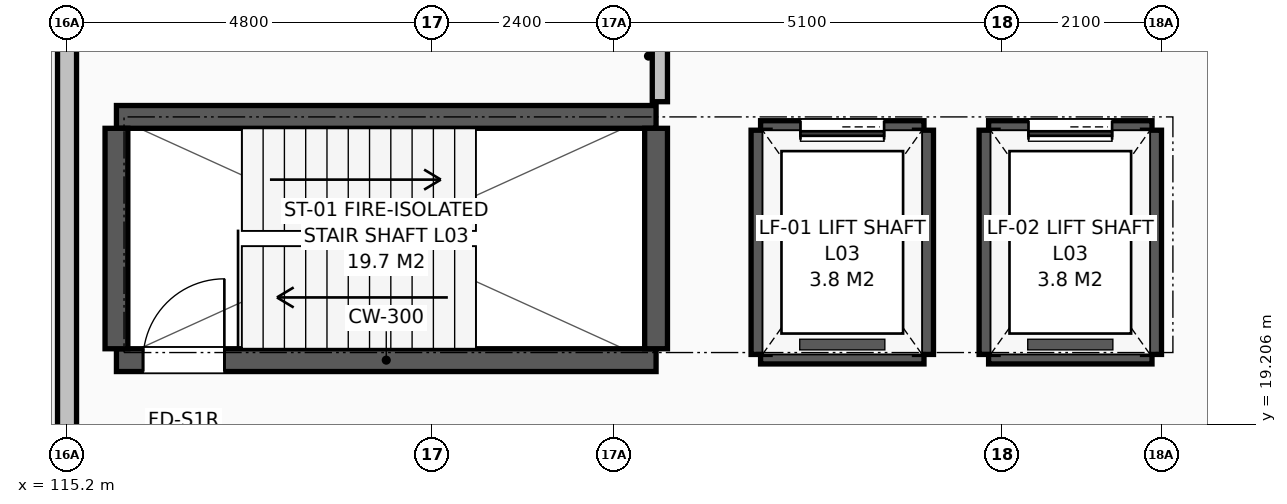
"""IFC4 building model, lengths in metres.
Left out: names, types, materials, properties, quantities, classifications, styles, units other than length and angle.
Written with IfcOpenShell. Run it as: python <this file> out.ifc"""

import sys

from ifc_helpers import new_model, si_unit, direction, frame, frame_2d, origin, place, context, subcontext, project, spatial, rectangle, extrude, element, fill, save


model = new_model("IFC4")
c1 = context("Model", 3, precision=1e-05, world=origin(), true_north=direction((0.0, 1.0)))
c2 = subcontext(c1, "Body", "Model", "MODEL_VIEW")
j1 = project(units=[si_unit("LENGTHUNIT", "METRE"), si_unit("PLANEANGLEUNIT", "RADIAN")], contexts=[c1])
p1 = place(None, origin())
s1 = spatial("IfcSite", under=j1, at=p1, CompositionType="ELEMENT")
p2 = place(p1, origin())
s2 = spatial("IfcBuilding", under=s1, at=p2, CompositionType="ELEMENT")
p3 = place(p2, frame((0.0, 0.0, 13.2)))
s3 = spatial("IfcBuildingStorey", under=s2, at=p3, CompositionType="ELEMENT", Elevation=13.2)
p4 = place(p3, frame((115.2, 32.4, 0.0), z_axis=(0.0, 0.0, 1.0), x_axis=(0.0, -1.0, 0.0)))
e1 = element("IfcWall", 1, at=p4, inside=s3, PredefinedType="SOLIDWALL", context=c2, shape_type="SweptSolid", body=[
    extrude(rectangle(XDim=30.0, YDim=0.25, at=frame_2d((15.0, 0.0))), origin(), (0.0, 0.0, 1.0), 3.253),
])
p5 = place(p4, frame((18.0, 0.0, 0.0)))
e2 = element("IfcOpeningElement", 2, at=p5, cuts=e1, PredefinedType="OPENING", context=c2, shape_type="SweptSolid", body=[
    extrude(rectangle(XDim=1.1, YDim=2.15, at=frame_2d((0.55, 1.075))), frame((0.0, 0.135, 0.0), z_axis=(0.0, -1.0, 0.0), x_axis=(1.0, 0.0, 0.0)), (0.0, 0.0, 1.0), 0.27),
])
p6 = place(p3, frame((115.85, 20.05, 0.0), z_axis=(0.0, 0.0, 1.0), x_axis=(1.0, 0.0, 0.0)))
e3 = element("IfcWall", 3, at=p6, inside=s3, PredefinedType="SHEAR", context=c2, shape_type="SweptSolid", body=[
    extrude(rectangle(XDim=7.1, YDim=0.3, at=frame_2d((3.55, 0.0))), origin(), (0.0, 0.0, 1.0), 3.45),
])
p7 = place(p6, frame((0.35, 0.0, 0.0)))
e4 = element("IfcOpeningElement", 4, at=p7, cuts=e3, PredefinedType="OPENING", context=c2, shape_type="SweptSolid", body=[
    extrude(rectangle(XDim=1.07, YDim=2.15, at=frame_2d((0.535, 1.075))), frame((0.0, 0.16, 0.0), z_axis=(0.0, -1.0, 0.0), x_axis=(1.0, 0.0, 0.0)), (0.0, 0.0, 1.0), 0.32),
])
p8 = place(p3, frame((122.95, 23.25, 0.0), z_axis=(0.0, 0.0, 1.0), x_axis=(-1.0, 0.0, 0.0)))
e5 = element("IfcWall", 5, at=p8, inside=s3, PredefinedType="SHEAR", context=c2, shape_type="SweptSolid", body=[
    extrude(rectangle(XDim=7.1, YDim=0.3, at=frame_2d((3.55, 0.0))), origin(), (0.0, 0.0, 1.0), 3.45),
])
for number, where, z_axis, x_axis in (
    (6, (122.95, 20.2, 0.0), (0.0, 0.0, 1.0), (0.0, 1.0, 0.0)),
    (7, (115.85, 23.1, 0.0), (0.0, 0.0, 1.0), (0.0, -1.0, 0.0)),
):
    element("IfcWall", number, at=place(p3, frame(where, z_axis=z_axis, x_axis=x_axis)), inside=s3, PredefinedType="SHEAR", context=c2, shape_type="SweptSolid", body=[
        extrude(rectangle(XDim=2.9, YDim=0.3, at=frame_2d((1.45, 0.0))), origin(), (0.0, 0.0, 1.0), 3.45),
    ])
p9 = place(p3, frame((124.325, 20.125, 0.0), z_axis=(0.0, 0.0, 1.0), x_axis=(1.0, 0.0, 0.0)))
e8 = element("IfcWall", 8, at=p9, inside=s3, PredefinedType="SHEAR", context=c2, shape_type="SweptSolid", body=[
    extrude(rectangle(XDim=2.15, YDim=0.25, at=frame_2d((1.075, 0.0))), origin(), (0.0, 0.0, 1.0), 3.55),
])
p10 = place(p3, frame((126.475, 23.075, 0.0), z_axis=(0.0, 0.0, 1.0), x_axis=(-1.0, 0.0, 0.0)))
e9 = element("IfcWall", 9, at=p10, inside=s3, PredefinedType="SHEAR", context=c2, shape_type="SweptSolid", body=[
    extrude(rectangle(XDim=2.15, YDim=0.25, at=frame_2d((1.075, 0.0))), origin(), (0.0, 0.0, 1.0), 3.55),
])
p11 = place(p10, frame((0.525, 0.0, 0.0)))
e10 = element("IfcOpeningElement", 10, at=p11, cuts=e9, PredefinedType="OPENING", context=c2, shape_type="SweptSolid", body=[
    extrude(rectangle(XDim=1.1, YDim=2.15, at=frame_2d((0.55, 1.075))), frame((0.0, 0.135, 0.0), z_axis=(0.0, -1.0, 0.0), x_axis=(1.0, 0.0, 0.0)), (0.0, 0.0, 1.0), 0.27),
])
for number, where, z_axis, x_axis in (
    (11, (124.325, 23.075, 0.0), (0.0, 0.0, 1.0), (0.0, -1.0, 0.0)),
    (12, (126.475, 20.125, 0.0), (0.0, 0.0, 1.0), (0.0, 1.0, 0.0)),
):
    element("IfcWall", number, at=place(p3, frame(where, z_axis=z_axis, x_axis=x_axis)), inside=s3, PredefinedType="SHEAR", context=c2, shape_type="SweptSolid", body=[
        extrude(rectangle(XDim=2.95, YDim=0.25, at=frame_2d((1.475, 0.0))), origin(), (0.0, 0.0, 1.0), 3.55),
    ])
p12 = place(p3, frame((127.325, 20.125, 0.0), z_axis=(0.0, 0.0, 1.0), x_axis=(1.0, 0.0, 0.0)))
e13 = element("IfcWall", 13, at=p12, inside=s3, PredefinedType="SHEAR", context=c2, shape_type="SweptSolid", body=[
    extrude(rectangle(XDim=2.15, YDim=0.25, at=frame_2d((1.075, 0.0))), origin(), (0.0, 0.0, 1.0), 3.55),
])
p13 = place(p3, frame((129.475, 23.075, 0.0), z_axis=(0.0, 0.0, 1.0), x_axis=(-1.0, 0.0, 0.0)))
e14 = element("IfcWall", 14, at=p13, inside=s3, PredefinedType="SHEAR", context=c2, shape_type="SweptSolid", body=[
    extrude(rectangle(XDim=2.15, YDim=0.25, at=frame_2d((1.075, 0.0))), origin(), (0.0, 0.0, 1.0), 3.55),
])
p14 = place(p13, frame((0.525, 0.0, 0.0)))
e15 = element("IfcOpeningElement", 15, at=p14, cuts=e14, PredefinedType="OPENING", context=c2, shape_type="SweptSolid", body=[
    extrude(rectangle(XDim=1.1, YDim=2.15, at=frame_2d((0.55, 1.075))), frame((0.0, 0.135, 0.0), z_axis=(0.0, -1.0, 0.0), x_axis=(1.0, 0.0, 0.0)), (0.0, 0.0, 1.0), 0.27),
])
for number, where, z_axis, x_axis in (
    (16, (127.325, 23.075, 0.0), (0.0, 0.0, 1.0), (0.0, -1.0, 0.0)),
    (17, (129.475, 20.125, 0.0), (0.0, 0.0, 1.0), (0.0, 1.0, 0.0)),
):
    element("IfcWall", number, at=place(p3, frame(where, z_axis=z_axis, x_axis=x_axis)), inside=s3, PredefinedType="SHEAR", context=c2, shape_type="SweptSolid", body=[
        extrude(rectangle(XDim=2.95, YDim=0.25, at=frame_2d((1.475, 0.0))), origin(), (0.0, 0.0, 1.0), 3.55),
    ])
p15 = place(p3, frame((123.0, 31.35, 0.0), z_axis=(0.0, 0.0, 1.0), x_axis=(0.0, -1.0, 0.0)))
e18 = element("IfcWall", 18, at=p15, inside=s3, PredefinedType="SOLIDWALL", context=c2, shape_type="SweptSolid", body=[
    extrude(rectangle(XDim=7.9, YDim=0.2, at=frame_2d((3.95, 0.0))), origin(), (0.0, 0.0, 1.0), 3.6),
])
p16 = place(p7, origin())
e19 = element("IfcDoor", 19, at=p16, inside=s3, OperationType="SINGLE_SWING_RIGHT", PredefinedType="DOOR", context=c2, shape_type="SweptSolid", body=[
    extrude(rectangle(XDim=1.07, YDim=2.15, at=frame_2d((0.535, 1.075))), frame((0.0, 0.025, 0.0), z_axis=(0.0, -1.0, 0.0), x_axis=(1.0, 0.0, 0.0)), (0.0, 0.0, 1.0), 0.05),
])
fill(e4, e19)
p17 = place(p11, origin())
e20 = element("IfcDoor", 20, at=p17, inside=s3, OperationType="SLIDING_TO_LEFT", PredefinedType="DOOR", context=c2, shape_type="SweptSolid", body=[
    extrude(rectangle(XDim=1.1, YDim=2.15, at=frame_2d((0.55, 1.075))), frame((0.0, 0.025, 0.0), z_axis=(0.0, -1.0, 0.0), x_axis=(1.0, 0.0, 0.0)), (0.0, 0.0, 1.0), 0.05),
])
fill(e10, e20)
p18 = place(p14, origin())
e21 = element("IfcDoor", 21, at=p18, inside=s3, OperationType="SLIDING_TO_LEFT", PredefinedType="DOOR", context=c2, shape_type="SweptSolid", body=[
    extrude(rectangle(XDim=1.1, YDim=2.15, at=frame_2d((0.55, 1.075))), frame((0.0, 0.025, 0.0), z_axis=(0.0, -1.0, 0.0), x_axis=(1.0, 0.0, 0.0)), (0.0, 0.0, 1.0), 0.05),
])
fill(e15, e21)
save(model, sys.argv[1])
